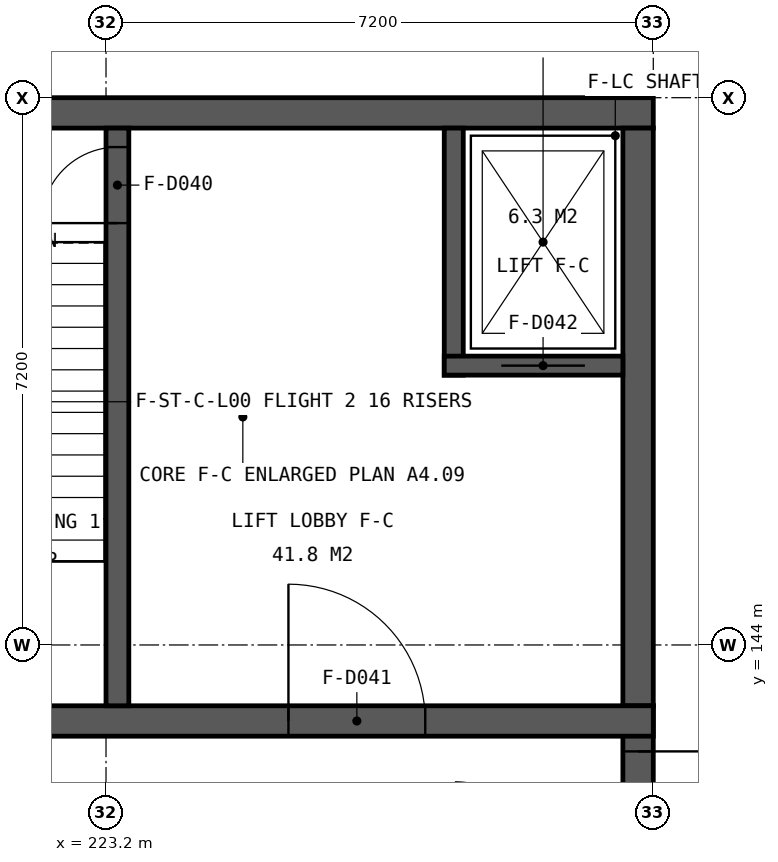
"""IFC4 building model, lengths in metres.
Left out: names, types, materials, properties, quantities, classifications, styles, units other than length and angle.
Written with IfcOpenShell. Run it as: python <this file> out.ifc"""

import sys

from ifc_helpers import new_model, si_unit, direction, frame, frame_2d, origin, place, context, subcontext, project, spatial, rectangle, extrude, element, fill, save


model = new_model("IFC4")
c1 = context("Model", 3, precision=1e-05, world=origin(), true_north=direction((0.0, 1.0)))
c2 = subcontext(c1, "Body", "Model", "MODEL_VIEW")
j1 = project(units=[si_unit("LENGTHUNIT", "METRE"), si_unit("PLANEANGLEUNIT", "RADIAN")], contexts=[c1])
p1 = place(None, origin())
s1 = spatial("IfcSite", under=j1, at=p1, CompositionType="ELEMENT")
p2 = place(p1, origin())
s2 = spatial("IfcBuilding", under=s1, at=p2, CompositionType="ELEMENT")
p3 = place(p2, frame((0.0, 0.0, 4.8)))
s3 = spatial("IfcBuildingStorey", under=s2, at=p3, CompositionType="ELEMENT", Elevation=4.8)
p4 = place(p3, frame((219.6, 151.0, 0.0), z_axis=(0.0, 0.0, 1.0), x_axis=(1.0, 0.0, 0.0)))
e1 = element("IfcWall", 1, at=p4, inside=s3, PredefinedType="SHEAR", context=c2, shape_type="SweptSolid", body=[
    extrude(rectangle(XDim=10.8, YDim=0.4, at=frame_2d((5.4, 0.0))), origin(), (0.0, 0.0, 1.0), 4.55),
])
p5 = place(p4, frame((1.45, 0.0, 0.0)))
e2 = element("IfcOpeningElement", 2, at=p5, cuts=e1, PredefinedType="OPENING", context=c2, shape_type="SweptSolid", body=[
    extrude(rectangle(XDim=1.1, YDim=2.1, at=frame_2d((0.55, 1.05))), frame((0.0, 0.21, 0.0), z_axis=(0.0, -1.0, 0.0), x_axis=(1.0, 0.0, 0.0)), (0.0, 0.0, 1.0), 0.42),
])
p6 = place(p3, frame((230.2, 143.2, 0.0), z_axis=(0.0, 0.0, 1.0), x_axis=(0.0, -1.0, 0.0)))
e3 = element("IfcWall", 3, at=p6, inside=s3, PredefinedType="SHEAR", context=c2, shape_type="SweptSolid", body=[
    extrude(rectangle(XDim=6.075, YDim=0.4, at=frame_2d((3.038, 0.0))), origin(), (0.0, 0.0, 1.0), 3.95),
])
p7 = place(p6, frame((0.6, 0.0, 0.0)))
e4 = element("IfcOpeningElement", 4, at=p7, cuts=e3, PredefinedType="OPENING", context=c2, shape_type="SweptSolid", body=[
    extrude(rectangle(XDim=1.1, YDim=2.1, at=frame_2d((0.55, 1.05))), frame((0.0, 0.21, 0.0), z_axis=(0.0, -1.0, 0.0), x_axis=(1.0, 0.0, 0.0)), (0.0, 0.0, 1.0), 0.42),
])
p8 = place(p3, frame((230.2, 150.8, 0.0), z_axis=(0.0, 0.0, 1.0), x_axis=(0.0, -1.0, 0.0)))
e5 = element("IfcWall", 5, at=p8, inside=s3, PredefinedType="SHEAR", context=c2, shape_type="SweptSolid", body=[
    extrude(rectangle(XDim=7.6, YDim=0.4, at=frame_2d((3.8, 0.0))), origin(), (0.0, 0.0, 1.0), 4.55),
])
p9 = place(p3, frame((219.6, 143.0, 0.0), z_axis=(0.0, 0.0, 1.0), x_axis=(1.0, 0.0, 0.0)))
e6 = element("IfcWall", 6, at=p9, inside=s3, PredefinedType="SHEAR", context=c2, shape_type="SweptSolid", body=[
    extrude(rectangle(XDim=10.8, YDim=0.4, at=frame_2d((5.4, 0.0))), origin(), (0.0, 0.0, 1.0), 4.55),
])
p10 = place(p9, frame((6.0, 0.0, 0.0)))
e7 = element("IfcOpeningElement", 7, at=p10, cuts=e6, PredefinedType="OPENING", context=c2, shape_type="SweptSolid", body=[
    extrude(rectangle(XDim=1.8, YDim=2.1, at=frame_2d((0.9, 1.05))), frame((0.0, 0.21, 0.0), z_axis=(0.0, -1.0, 0.0), x_axis=(1.0, 0.0, 0.0)), (0.0, 0.0, 1.0), 0.42),
])
p11 = place(p3, frame((223.35, 143.2, 0.0), z_axis=(0.0, 0.0, 1.0), x_axis=(0.0, 1.0, 0.0)))
e8 = element("IfcWall", 8, at=p11, inside=s3, PredefinedType="SHEAR", context=c2, shape_type="SweptSolid", body=[
    extrude(rectangle(XDim=7.6, YDim=0.3, at=frame_2d((3.8, 0.0))), origin(), (0.0, 0.0, 1.0), 4.55),
])
p12 = place(p11, frame((6.35, 0.0, 0.0)))
e9 = element("IfcOpeningElement", 9, at=p12, cuts=e8, PredefinedType="OPENING", context=c2, shape_type="SweptSolid", body=[
    extrude(rectangle(XDim=1.0, YDim=2.1, at=frame_2d((0.5, 1.05))), frame((0.0, 0.16, 0.0), z_axis=(0.0, -1.0, 0.0), x_axis=(1.0, 0.0, 0.0)), (0.0, 0.0, 1.0), 0.32),
])
p13 = place(p3, frame((227.775, 147.55, 0.0), z_axis=(0.0, 0.0, 1.0), x_axis=(0.0, 1.0, 0.0)))
e10 = element("IfcWall", 10, at=p13, inside=s3, PredefinedType="SHEAR", context=c2, shape_type="SweptSolid", body=[
    extrude(rectangle(XDim=3.25, YDim=0.25, at=frame_2d((1.625, 0.0))), origin(), (0.0, 0.0, 1.0), 4.55),
])
p14 = place(p3, frame((227.65, 147.675, 0.0), z_axis=(0.0, 0.0, 1.0), x_axis=(1.0, 0.0, 0.0)))
e11 = element("IfcWall", 11, at=p14, inside=s3, PredefinedType="SHEAR", context=c2, shape_type="SweptSolid", body=[
    extrude(rectangle(XDim=2.35, YDim=0.25, at=frame_2d((1.175, 0.0))), origin(), (0.0, 0.0, 1.0), 4.55),
])
p15 = place(p14, frame((0.75, 0.0, 0.0)))
e12 = element("IfcOpeningElement", 12, at=p15, cuts=e11, PredefinedType="OPENING", context=c2, shape_type="SweptSolid", body=[
    extrude(rectangle(XDim=1.1, YDim=2.1, at=frame_2d((0.55, 1.05))), frame((0.0, 0.135, 0.0), z_axis=(0.0, -1.0, 0.0), x_axis=(1.0, 0.0, 0.0)), (0.0, 0.0, 1.0), 0.27),
])
p16 = place(p7, origin())
e13 = element("IfcDoor", 13, at=p16, inside=s3, OperationType="NOTDEFINED", PredefinedType="DOOR", context=c2, shape_type="SweptSolid", body=[
    extrude(rectangle(XDim=1.1, YDim=2.1, at=frame_2d((0.55, 1.05))), frame((0.0, 0.025, 0.0), z_axis=(0.0, -1.0, 0.0), x_axis=(1.0, 0.0, 0.0)), (0.0, 0.0, 1.0), 0.05),
])
fill(e4, e13)
p17 = place(p12, origin())
e14 = element("IfcDoor", 14, at=p17, inside=s3, OperationType="NOTDEFINED", PredefinedType="DOOR", context=c2, shape_type="SweptSolid", body=[
    extrude(rectangle(XDim=1.0, YDim=2.1, at=frame_2d((0.5, 1.05))), frame((0.0, 0.025, 0.0), z_axis=(0.0, -1.0, 0.0), x_axis=(1.0, 0.0, 0.0)), (0.0, 0.0, 1.0), 0.05),
])
fill(e9, e14)
p18 = place(p10, origin())
e15 = element("IfcDoor", 15, at=p18, inside=s3, OperationType="NOTDEFINED", PredefinedType="DOOR", context=c2, shape_type="SweptSolid", body=[
    extrude(rectangle(XDim=1.8, YDim=2.1, at=frame_2d((0.9, 1.05))), frame((0.0, 0.025, 0.0), z_axis=(0.0, -1.0, 0.0), x_axis=(1.0, 0.0, 0.0)), (0.0, 0.0, 1.0), 0.05),
])
fill(e7, e15)
p19 = place(p15, origin())
e16 = element("IfcDoor", 16, at=p19, inside=s3, OperationType="SLIDING_TO_LEFT", PredefinedType="DOOR", context=c2, shape_type="SweptSolid", body=[
    extrude(rectangle(XDim=1.1, YDim=2.1, at=frame_2d((0.55, 1.05))), frame((0.0, 0.025, 0.0), z_axis=(0.0, -1.0, 0.0), x_axis=(1.0, 0.0, 0.0)), (0.0, 0.0, 1.0), 0.05),
])
fill(e12, e16)
save(model, sys.argv[1])
